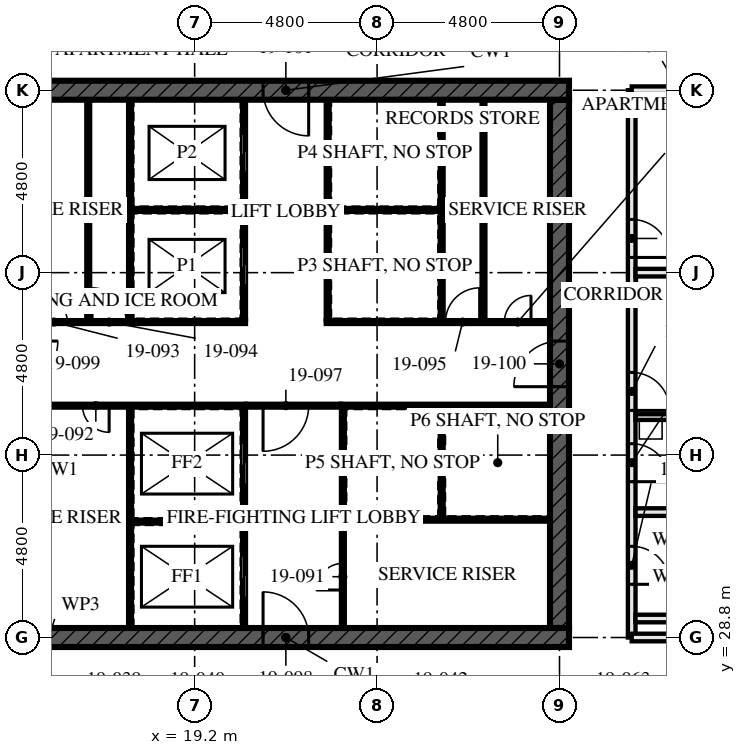
"""IFC4 building model, lengths in metres.
Left out: names, types, materials, properties, quantities, classifications, styles, units other than length and angle.
Written with IfcOpenShell. Run it as: python <this file> out.ifc"""

import sys

from ifc_helpers import new_model, si_unit, direction, frame, frame_2d, origin, place, context, subcontext, project, spatial, rectangle, extrude, element, fill, save


model = new_model("IFC4")
c1 = context("Model", 3, precision=1e-05, world=origin(), true_north=direction((0.0, 1.0)))
c2 = subcontext(c1, "Body", "Model", "MODEL_VIEW")
j1 = project(units=[si_unit("LENGTHUNIT", "METRE"), si_unit("PLANEANGLEUNIT", "RADIAN")], contexts=[c1])
p1 = place(None, origin())
s1 = spatial("IfcSite", under=j1, at=p1, CompositionType="ELEMENT")
p2 = place(p1, origin())
s2 = spatial("IfcBuilding", under=s1, at=p2, CompositionType="ELEMENT")
p3 = place(p2, frame((0.0, 0.0, 72.5)))
s3 = spatial("IfcBuildingStorey", under=s2, at=p3, CompositionType="ELEMENT", Elevation=72.5)
p4 = place(p3, frame((14.15, 28.8, -0.17), z_axis=(0.0, 0.0, 1.0), x_axis=(1.0, 0.0, 0.0)))
e1 = element("IfcWall", 1, at=p4, inside=s3, PredefinedType="SHEAR", context=c2, shape_type="SweptSolid", body=[
    extrude(rectangle(XDim=14.9, YDim=0.5, at=frame_2d((7.45, 0.0))), origin(), (0.0, 0.0, 1.0), 3.5),
])
p5 = place(p4, frame((6.85, 0.0, 0.17)))
e2 = element("IfcOpeningElement", 2, at=p5, cuts=e1, PredefinedType="OPENING", context=c2, shape_type="SweptSolid", body=[
    extrude(rectangle(XDim=1.2, YDim=2.1, at=frame_2d((0.6, 1.05))), frame((0.0, 0.26, 0.0), z_axis=(0.0, -1.0, 0.0), x_axis=(1.0, 0.0, 0.0)), (0.0, 0.0, 1.0), 0.521),
])
p6 = place(p3, frame((29.05, 43.2, -0.17), z_axis=(0.0, 0.0, 1.0), x_axis=(-1.0, 0.0, 0.0)))
e3 = element("IfcWall", 3, at=p6, inside=s3, PredefinedType="SHEAR", context=c2, shape_type="SweptSolid", body=[
    extrude(rectangle(XDim=14.9, YDim=0.5, at=frame_2d((7.45, 0.0))), origin(), (0.0, 0.0, 1.0), 3.5),
])
p7 = place(p6, frame((6.85, 0.0, 0.17)))
e4 = element("IfcOpeningElement", 4, at=p7, cuts=e3, PredefinedType="OPENING", context=c2, shape_type="SweptSolid", body=[
    extrude(rectangle(XDim=1.2, YDim=2.1, at=frame_2d((0.6, 1.05))), frame((0.0, 0.26, 0.0), z_axis=(0.0, -1.0, 0.0), x_axis=(1.0, 0.0, 0.0)), (0.0, 0.0, 1.0), 0.521),
])
p8 = place(p3, frame((28.8, 29.05, -0.17), z_axis=(0.0, 0.0, 1.0), x_axis=(0.0, 1.0, 0.0)))
e5 = element("IfcWall", 5, at=p8, inside=s3, PredefinedType="SHEAR", context=c2, shape_type="SweptSolid", body=[
    extrude(rectangle(XDim=13.9, YDim=0.5, at=frame_2d((6.95, 0.0))), origin(), (0.0, 0.0, 1.0), 3.5),
])
p9 = place(p8, frame((6.35, 0.0, 0.17)))
e6 = element("IfcOpeningElement", 6, at=p9, cuts=e5, PredefinedType="OPENING", context=c2, shape_type="SweptSolid", body=[
    extrude(rectangle(XDim=1.2, YDim=2.1, at=frame_2d((0.6, 1.05))), frame((0.0, 0.26, 0.0), z_axis=(0.0, -1.0, 0.0), x_axis=(1.0, 0.0, 0.0)), (0.0, 0.0, 1.0), 0.521),
])
for number, where, z_axis, x_axis in (
    (7, (35.5, 29.3, 0.0), (0.0, 0.0, 1.0), (-1.0, 0.0, 0.0)),
    (8, (35.5, 32.1, 0.0), (0.0, 0.0, 1.0), (-1.0, 0.0, 0.0)),
):
    element("IfcWall", number, at=place(p3, frame(where, z_axis=z_axis, x_axis=x_axis)), inside=s3, PredefinedType="SOLIDWALL", context=c2, shape_type="SweptSolid", body=[
        extrude(rectangle(XDim=4.7, YDim=0.2, at=frame_2d((2.35, 0.0))), origin(), (0.0, 0.0, 1.0), 2.99),
    ])
p10 = place(p3, frame((33.8, 34.6, 0.0), z_axis=(0.0, 0.0, 1.0), x_axis=(-1.0, 0.0, 0.0)))
e9 = element("IfcWall", 9, at=p10, inside=s3, PredefinedType="PARTITIONING", context=c2, shape_type="SweptSolid", body=[
    extrude(rectangle(XDim=3.0, YDim=0.15, at=frame_2d((1.5, 0.0))), origin(), (0.0, 0.0, 1.0), 3.33),
])
p11 = place(p3, frame((42.88, 38.4, 0.0), z_axis=(0.0, 0.0, 1.0), x_axis=(-1.0, 0.0, 0.0)))
e10 = element("IfcWall", 10, at=p11, inside=s3, PredefinedType="PARTITIONING", context=c2, shape_type="SweptSolid", body=[
    extrude(rectangle(XDim=12.08, YDim=0.2, at=frame_2d((6.04, 0.0))), origin(), (0.0, 0.0, 1.0), 2.55),
])
p12 = place(p3, frame((30.7, 28.8, 0.0), z_axis=(0.0, 0.0, 1.0), x_axis=(0.0, 1.0, 0.0)))
e11 = element("IfcWall", 11, at=p12, inside=s3, PredefinedType="PARTITIONING", context=c2, shape_type="SweptSolid", body=[
    extrude(rectangle(XDim=14.4, YDim=0.2, at=frame_2d((7.2, 0.0))), origin(), (0.0, 0.0, 1.0), 2.55),
])
p13 = place(p12, frame((1.4, 0.0, 0.0)))
e12 = element("IfcOpeningElement", 12, at=p13, cuts=e11, PredefinedType="OPENING", context=c2, shape_type="SweptSolid", body=[
    extrude(rectangle(XDim=1.0, YDim=2.1, at=frame_2d((0.5, 1.05))), frame((0.0, 0.111, 0.0), z_axis=(0.0, -1.0, 0.0), x_axis=(1.0, 0.0, 0.0)), (0.0, 0.0, 1.0), 0.221),
])
p14 = place(p12, frame((4.1, 0.0, 0.0)))
e13 = element("IfcOpeningElement", 13, at=p14, cuts=e11, PredefinedType="OPENING", context=c2, shape_type="SweptSolid", body=[
    extrude(rectangle(XDim=1.0, YDim=2.1, at=frame_2d((0.5, 1.05))), frame((0.0, 0.111, 0.0), z_axis=(0.0, -1.0, 0.0), x_axis=(1.0, 0.0, 0.0)), (0.0, 0.0, 1.0), 0.221),
])
p15 = place(p12, frame((5.975, 0.0, 0.0)))
e14 = element("IfcOpeningElement", 14, at=p15, cuts=e11, PredefinedType="OPENING", context=c2, shape_type="SweptSolid", body=[
    extrude(rectangle(XDim=1.0, YDim=2.1, at=frame_2d((0.5, 1.05))), frame((0.0, 0.111, 0.0), z_axis=(0.0, -1.0, 0.0), x_axis=(1.0, 0.0, 0.0)), (0.0, 0.0, 1.0), 0.221),
])
p16 = place(p12, frame((10.0, 0.0, 0.0)))
e15 = element("IfcOpeningElement", 15, at=p16, cuts=e11, PredefinedType="OPENING", context=c2, shape_type="SweptSolid", body=[
    extrude(rectangle(XDim=1.0, YDim=2.1, at=frame_2d((0.5, 1.05))), frame((0.0, 0.111, 0.0), z_axis=(0.0, -1.0, 0.0), x_axis=(1.0, 0.0, 0.0)), (0.0, 0.0, 1.0), 0.221),
])
for number, where, z_axis, x_axis in (
    (16, (16.4, 37.15, 0.0), (0.0, 0.0, 1.0), (0.0, 1.0, 0.0)),
    (17, (26.8, 37.15, 0.0), (0.0, 0.0, 1.0), (0.0, 1.0, 0.0)),
):
    element("IfcWall", number, at=place(p3, frame(where, z_axis=z_axis, x_axis=x_axis)), inside=s3, PredefinedType="SOLIDWALL", context=c2, shape_type="SweptSolid", body=[
        extrude(rectangle(XDim=5.8, YDim=0.1, at=frame_2d((2.9, 0.0))), origin(), (0.0, 0.0, 1.0), 3.33),
    ])
p17 = place(p3, frame((20.5, 29.05, 0.0), z_axis=(0.0, 0.0, 1.0), x_axis=(0.0, 1.0, 0.0)))
e18 = element("IfcWall", 18, at=p17, inside=s3, PredefinedType="SOLIDWALL", context=c2, shape_type="SweptSolid", body=[
    extrude(rectangle(XDim=5.8, YDim=0.1, at=frame_2d((2.9, 0.0))), origin(), (0.0, 0.0, 1.0), 3.33),
])
p18 = place(p17, frame((0.8, 0.0, 0.0)))
e19 = element("IfcOpeningElement", 19, at=p18, cuts=e18, PredefinedType="OPENING", context=c2, shape_type="SweptSolid", body=[
    extrude(rectangle(XDim=1.1, YDim=2.3, at=frame_2d((0.55, 1.15))), frame((0.0, 0.061, 0.0), z_axis=(0.0, -1.0, 0.0), x_axis=(1.0, 0.0, 0.0)), (0.0, 0.0, 1.0), 0.121),
])
p19 = place(p17, frame((3.775, 0.0, 0.0)))
e20 = element("IfcOpeningElement", 20, at=p19, cuts=e18, PredefinedType="OPENING", context=c2, shape_type="SweptSolid", body=[
    extrude(rectangle(XDim=1.1, YDim=2.3, at=frame_2d((0.55, 1.15))), frame((0.0, 0.061, 0.0), z_axis=(0.0, -1.0, 0.0), x_axis=(1.0, 0.0, 0.0)), (0.0, 0.0, 1.0), 0.121),
])
p20 = place(p3, frame((20.5, 37.15, 0.0), z_axis=(0.0, 0.0, 1.0), x_axis=(0.0, 1.0, 0.0)))
e21 = element("IfcWall", 21, at=p20, inside=s3, PredefinedType="SOLIDWALL", context=c2, shape_type="SweptSolid", body=[
    extrude(rectangle(XDim=5.8, YDim=0.1, at=frame_2d((2.9, 0.0))), origin(), (0.0, 0.0, 1.0), 3.33),
])
p21 = place(p20, frame((0.925, 0.0, 0.0)))
e22 = element("IfcOpeningElement", 22, at=p21, cuts=e21, PredefinedType="OPENING", context=c2, shape_type="SweptSolid", body=[
    extrude(rectangle(XDim=1.0, YDim=2.1, at=frame_2d((0.5, 1.05))), frame((0.0, 0.061, 0.0), z_axis=(0.0, -1.0, 0.0), x_axis=(1.0, 0.0, 0.0)), (0.0, 0.0, 1.0), 0.121),
])
p22 = place(p20, frame((3.9, 0.0, 0.0)))
e23 = element("IfcOpeningElement", 23, at=p22, cuts=e21, PredefinedType="OPENING", context=c2, shape_type="SweptSolid", body=[
    extrude(rectangle(XDim=1.0, YDim=2.1, at=frame_2d((0.5, 1.05))), frame((0.0, 0.061, 0.0), z_axis=(0.0, -1.0, 0.0), x_axis=(1.0, 0.0, 0.0)), (0.0, 0.0, 1.0), 0.121),
])
p23 = place(p3, frame((22.7, 37.15, 0.0), z_axis=(0.0, 0.0, 1.0), x_axis=(0.0, 1.0, 0.0)))
e24 = element("IfcWall", 24, at=p23, inside=s3, PredefinedType="SOLIDWALL", context=c2, shape_type="SweptSolid", body=[
    extrude(rectangle(XDim=5.8, YDim=0.1, at=frame_2d((2.9, 0.0))), origin(), (0.0, 0.0, 1.0), 3.33),
])
p24 = place(p3, frame((23.1, 29.05, 0.0), z_axis=(0.0, 0.0, 1.0), x_axis=(0.0, 1.0, 0.0)))
e25 = element("IfcWall", 25, at=p24, inside=s3, PredefinedType="SOLIDWALL", context=c2, shape_type="SweptSolid", body=[
    extrude(rectangle(XDim=5.8, YDim=0.1, at=frame_2d((2.9, 0.0))), origin(), (0.0, 0.0, 1.0), 3.33),
])
p25 = place(p24, frame((1.0, 0.0, 0.0)))
e26 = element("IfcOpeningElement", 26, at=p25, cuts=e25, PredefinedType="OPENING", context=c2, shape_type="SweptSolid", body=[
    extrude(rectangle(XDim=0.7, YDim=2.1, at=frame_2d((0.35, 1.05))), frame((0.0, 0.061, 0.0), z_axis=(0.0, -1.0, 0.0), x_axis=(1.0, 0.0, 0.0)), (0.0, 0.0, 1.0), 0.121),
])
p26 = place(p3, frame((14.65, 34.9, 0.0), z_axis=(0.0, 0.0, 1.0), x_axis=(1.0, 0.0, 0.0)))
e27 = element("IfcWall", 27, at=p26, inside=s3, PredefinedType="SOLIDWALL", context=c2, shape_type="SweptSolid", body=[
    extrude(rectangle(XDim=5.9, YDim=0.1, at=frame_2d((2.95, 0.0))), origin(), (0.0, 0.0, 1.0), 3.33),
])
p27 = place(p26, frame((1.6, 0.0, 0.0)))
e28 = element("IfcOpeningElement", 28, at=p27, cuts=e27, PredefinedType="OPENING", context=c2, shape_type="SweptSolid", body=[
    extrude(rectangle(XDim=0.7, YDim=2.1, at=frame_2d((0.35, 1.05))), frame((0.0, 0.061, 0.0), z_axis=(0.0, -1.0, 0.0), x_axis=(1.0, 0.0, 0.0)), (0.0, 0.0, 1.0), 0.121),
])
p28 = place(p3, frame((23.05, 34.9, 0.0), z_axis=(0.0, 0.0, 1.0), x_axis=(1.0, 0.0, 0.0)))
e29 = element("IfcWall", 29, at=p28, inside=s3, PredefinedType="SOLIDWALL", context=c2, shape_type="SweptSolid", body=[
    extrude(rectangle(XDim=5.5, YDim=0.1, at=frame_2d((2.75, 0.0))), origin(), (0.0, 0.0, 1.0), 3.33),
])
p29 = place(p3, frame((14.65, 37.1, 0.0), z_axis=(0.0, 0.0, 1.0), x_axis=(1.0, 0.0, 0.0)))
e30 = element("IfcWall", 30, at=p29, inside=s3, PredefinedType="SOLIDWALL", context=c2, shape_type="SweptSolid", body=[
    extrude(rectangle(XDim=5.9, YDim=0.1, at=frame_2d((2.95, 0.0))), origin(), (0.0, 0.0, 1.0), 3.33),
])
p30 = place(p29, frame((0.5, 0.0, 0.0)))
e31 = element("IfcOpeningElement", 31, at=p30, cuts=e30, PredefinedType="OPENING", context=c2, shape_type="SweptSolid", body=[
    extrude(rectangle(XDim=0.7, YDim=2.1, at=frame_2d((0.35, 1.05))), frame((0.0, 0.061, 0.0), z_axis=(0.0, -1.0, 0.0), x_axis=(1.0, 0.0, 0.0)), (0.0, 0.0, 1.0), 0.121),
])
p31 = place(p29, frame((1.85, 0.0, 0.0)))
e32 = element("IfcOpeningElement", 32, at=p31, cuts=e30, PredefinedType="OPENING", context=c2, shape_type="SweptSolid", body=[
    extrude(rectangle(XDim=0.9, YDim=2.1, at=frame_2d((0.45, 1.05))), frame((0.0, 0.061, 0.0), z_axis=(0.0, -1.0, 0.0), x_axis=(1.0, 0.0, 0.0)), (0.0, 0.0, 1.0), 0.121),
])
p32 = place(p3, frame((22.65, 37.1, 0.0), z_axis=(0.0, 0.0, 1.0), x_axis=(1.0, 0.0, 0.0)))
e33 = element("IfcWall", 33, at=p32, inside=s3, PredefinedType="SOLIDWALL", context=c2, shape_type="SweptSolid", body=[
    extrude(rectangle(XDim=5.9, YDim=0.1, at=frame_2d((2.95, 0.0))), origin(), (0.0, 0.0, 1.0), 3.33),
])
p33 = place(p32, frame((3.15, 0.0, 0.0)))
e34 = element("IfcOpeningElement", 34, at=p33, cuts=e33, PredefinedType="OPENING", context=c2, shape_type="SweptSolid", body=[
    extrude(rectangle(XDim=0.9, YDim=2.1, at=frame_2d((0.45, 1.05))), frame((0.0, 0.061, 0.0), z_axis=(0.0, -1.0, 0.0), x_axis=(1.0, 0.0, 0.0)), (0.0, 0.0, 1.0), 0.121),
])
p34 = place(p32, frame((4.7, 0.0, 0.0)))
e35 = element("IfcOpeningElement", 35, at=p34, cuts=e33, PredefinedType="OPENING", context=c2, shape_type="SweptSolid", body=[
    extrude(rectangle(XDim=0.7, YDim=2.1, at=frame_2d((0.35, 1.05))), frame((0.0, 0.061, 0.0), z_axis=(0.0, -1.0, 0.0), x_axis=(1.0, 0.0, 0.0)), (0.0, 0.0, 1.0), 0.121),
])
p35 = place(p3, frame((20.55, 34.9, 0.0), z_axis=(0.0, 0.0, 1.0), x_axis=(1.0, 0.0, 0.0)))
e36 = element("IfcWall", 36, at=p35, inside=s3, PredefinedType="SOLIDWALL", context=c2, shape_type="SweptSolid", body=[
    extrude(rectangle(XDim=2.5, YDim=0.1, at=frame_2d((1.25, 0.0))), origin(), (0.0, 0.0, 1.0), 3.33),
])
p36 = place(p35, frame((0.45, 0.0, 0.0)))
e37 = element("IfcOpeningElement", 37, at=p36, cuts=e36, PredefinedType="OPENING", context=c2, shape_type="SweptSolid", body=[
    extrude(rectangle(XDim=1.2, YDim=2.1, at=frame_2d((0.6, 1.05))), frame((0.0, 0.061, 0.0), z_axis=(0.0, -1.0, 0.0), x_axis=(1.0, 0.0, 0.0)), (0.0, 0.0, 1.0), 0.121),
])
p37 = place(p3, frame((17.5, 29.05, 0.0), z_axis=(0.0, 0.0, 1.0), x_axis=(0.0, 1.0, 0.0)))
e38 = element("IfcWall", 38, at=p37, inside=s3, PredefinedType="SOLIDWALL", context=c2, shape_type="SweptSolid", body=[
    extrude(rectangle(XDim=5.8, YDim=0.1, at=frame_2d((2.9, 0.0))), origin(), (0.0, 0.0, 1.0), 3.33),
])
p38 = place(p3, frame((17.55, 31.85, 0.0), z_axis=(0.0, 0.0, 1.0), x_axis=(1.0, 0.0, 0.0)))
e39 = element("IfcWall", 39, at=p38, inside=s3, PredefinedType="SOLIDWALL", context=c2, shape_type="SweptSolid", body=[
    extrude(rectangle(XDim=2.9, YDim=0.1, at=frame_2d((1.45, 0.0))), origin(), (0.0, 0.0, 1.0), 3.33),
])
p39 = place(p3, frame((17.5, 37.15, 0.0), z_axis=(0.0, 0.0, 1.0), x_axis=(0.0, 1.0, 0.0)))
e40 = element("IfcWall", 40, at=p39, inside=s3, PredefinedType="SOLIDWALL", context=c2, shape_type="SweptSolid", body=[
    extrude(rectangle(XDim=5.8, YDim=0.1, at=frame_2d((2.9, 0.0))), origin(), (0.0, 0.0, 1.0), 3.33),
])
for number, where, z_axis, x_axis in (
    (41, (17.55, 40.05, 0.0), (0.0, 0.0, 1.0), (1.0, 0.0, 0.0)),
    (42, (22.75, 40.05, 0.0), (0.0, 0.0, 1.0), (1.0, 0.0, 0.0)),
):
    element("IfcWall", number, at=place(p3, frame(where, z_axis=z_axis, x_axis=x_axis)), inside=s3, PredefinedType="SOLIDWALL", context=c2, shape_type="SweptSolid", body=[
        extrude(rectangle(XDim=2.9, YDim=0.1, at=frame_2d((1.45, 0.0))), origin(), (0.0, 0.0, 1.0), 3.33),
    ])
p40 = place(p3, frame((25.7, 37.15, 0.0), z_axis=(0.0, 0.0, 1.0), x_axis=(0.0, 1.0, 0.0)))
e43 = element("IfcWall", 43, at=p40, inside=s3, PredefinedType="SOLIDWALL", context=c2, shape_type="SweptSolid", body=[
    extrude(rectangle(XDim=5.8, YDim=0.1, at=frame_2d((2.9, 0.0))), origin(), (0.0, 0.0, 1.0), 3.33),
])
p41 = place(p3, frame((25.7, 31.95, 0.0), z_axis=(0.0, 0.0, 1.0), x_axis=(0.0, 1.0, 0.0)))
e44 = element("IfcWall", 44, at=p41, inside=s3, PredefinedType="SOLIDWALL", context=c2, shape_type="SweptSolid", body=[
    extrude(rectangle(XDim=2.9, YDim=0.1, at=frame_2d((1.45, 0.0))), origin(), (0.0, 0.0, 1.0), 3.33),
])
p42 = place(p3, frame((23.15, 31.9, 0.0), z_axis=(0.0, 0.0, 1.0), x_axis=(1.0, 0.0, 0.0)))
e45 = element("IfcWall", 45, at=p42, inside=s3, PredefinedType="SOLIDWALL", context=c2, shape_type="SweptSolid", body=[
    extrude(rectangle(XDim=5.4, YDim=0.1, at=frame_2d((2.7, 0.0))), origin(), (0.0, 0.0, 1.0), 3.33),
])
for number, where, z_axis, x_axis in (
    (46, (33.205, 28.8, 0.0), (0.0, 0.0, 1.0), (-1.0, 0.0, 0.0)),
    (47, (33.205, 43.2, 0.0), (0.0, 0.0, 1.0), (-1.0, 0.0, 0.0)),
):
    element("IfcWall", number, at=place(p3, frame(where, z_axis=z_axis, x_axis=x_axis)), inside=s3, PredefinedType="PARTITIONING", context=c2, shape_type="SweptSolid", body=[
        extrude(rectangle(XDim=2.505, YDim=0.2, at=frame_2d((1.252, 0.0))), origin(), (0.0, 0.0, 1.0), 2.32),
    ])
p43 = place(p13, frame((1.0, 0.0, 0.0), z_axis=(0.0, 0.0, 1.0), x_axis=(-1.0, 0.0, 0.0)))
e48 = element("IfcDoor", 48, at=p43, inside=s3, OperationType="SINGLE_SWING_LEFT", PredefinedType="DOOR", context=c2, shape_type="SweptSolid", body=[
    extrude(rectangle(XDim=1.0, YDim=2.1, at=frame_2d((0.5, 1.05))), frame((0.0, 0.032, 0.0), z_axis=(0.0, -1.0, 0.0), x_axis=(1.0, 0.0, 0.0)), (0.0, 0.0, 1.0), 0.064),
])
fill(e12, e48)
p44 = place(p14, frame((1.0, 0.0, 0.0), z_axis=(0.0, 0.0, 1.0), x_axis=(-1.0, 0.0, 0.0)))
e49 = element("IfcDoor", 49, at=p44, inside=s3, OperationType="SINGLE_SWING_LEFT", PredefinedType="DOOR", context=c2, shape_type="SweptSolid", body=[
    extrude(rectangle(XDim=1.0, YDim=2.1, at=frame_2d((0.5, 1.05))), frame((0.0, 0.027, 0.0), z_axis=(0.0, -1.0, 0.0), x_axis=(1.0, 0.0, 0.0)), (0.0, 0.0, 1.0), 0.054),
])
fill(e13, e49)
p45 = place(p15, frame((1.0, 0.0, 0.0), z_axis=(0.0, 0.0, 1.0), x_axis=(-1.0, 0.0, 0.0)))
e50 = element("IfcDoor", 50, at=p45, inside=s3, OperationType="SINGLE_SWING_LEFT", PredefinedType="DOOR", context=c2, shape_type="SweptSolid", body=[
    extrude(rectangle(XDim=1.0, YDim=2.1, at=frame_2d((0.5, 1.05))), frame((0.0, 0.027, 0.0), z_axis=(0.0, -1.0, 0.0), x_axis=(1.0, 0.0, 0.0)), (0.0, 0.0, 1.0), 0.054),
])
fill(e14, e50)
p46 = place(p16, frame((1.0, 0.0, 0.0), z_axis=(0.0, 0.0, 1.0), x_axis=(-1.0, 0.0, 0.0)))
e51 = element("IfcDoor", 51, at=p46, inside=s3, OperationType="SINGLE_SWING_LEFT", PredefinedType="DOOR", context=c2, shape_type="SweptSolid", body=[
    extrude(rectangle(XDim=1.0, YDim=2.1, at=frame_2d((0.5, 1.05))), frame((0.0, 0.027, 0.0), z_axis=(0.0, -1.0, 0.0), x_axis=(1.0, 0.0, 0.0)), (0.0, 0.0, 1.0), 0.054),
])
fill(e15, e51)
p47 = place(p18, origin())
e52 = element("IfcDoor", 52, at=p47, inside=s3, OperationType="SLIDING_TO_LEFT", PredefinedType="DOOR", context=c2, shape_type="SweptSolid", body=[
    extrude(rectangle(XDim=1.1, YDim=2.3, at=frame_2d((0.55, 1.15))), frame((0.0, 0.05, 0.0), z_axis=(0.0, -1.0, 0.0), x_axis=(1.0, 0.0, 0.0)), (0.0, 0.0, 1.0), 0.1),
])
fill(e19, e52)
p48 = place(p19, origin())
e53 = element("IfcDoor", 53, at=p48, inside=s3, OperationType="SLIDING_TO_LEFT", PredefinedType="DOOR", context=c2, shape_type="SweptSolid", body=[
    extrude(rectangle(XDim=1.1, YDim=2.3, at=frame_2d((0.55, 1.15))), frame((0.0, 0.05, 0.0), z_axis=(0.0, -1.0, 0.0), x_axis=(1.0, 0.0, 0.0)), (0.0, 0.0, 1.0), 0.1),
])
fill(e20, e53)
p49 = place(p21, origin())
e54 = element("IfcDoor", 54, at=p49, inside=s3, OperationType="SLIDING_TO_LEFT", PredefinedType="DOOR", context=c2, shape_type="SweptSolid", body=[
    extrude(rectangle(XDim=1.0, YDim=2.1, at=frame_2d((0.5, 1.05))), frame((0.0, 0.05, 0.0), z_axis=(0.0, -1.0, 0.0), x_axis=(1.0, 0.0, 0.0)), (0.0, 0.0, 1.0), 0.1),
])
fill(e22, e54)
p50 = place(p22, origin())
e55 = element("IfcDoor", 55, at=p50, inside=s3, OperationType="SLIDING_TO_LEFT", PredefinedType="DOOR", context=c2, shape_type="SweptSolid", body=[
    extrude(rectangle(XDim=1.0, YDim=2.1, at=frame_2d((0.5, 1.05))), frame((0.0, 0.05, 0.0), z_axis=(0.0, -1.0, 0.0), x_axis=(1.0, 0.0, 0.0)), (0.0, 0.0, 1.0), 0.1),
])
fill(e23, e55)
p51 = place(p25, origin())
e56 = element("IfcDoor", 56, at=p51, inside=s3, OperationType="SINGLE_SWING_RIGHT", PredefinedType="DOOR", context=c2, shape_type="SweptSolid", body=[
    extrude(rectangle(XDim=0.7, YDim=2.1, at=frame_2d((0.35, 1.05))), frame((0.0, 0.027, 0.0), z_axis=(0.0, -1.0, 0.0), x_axis=(1.0, 0.0, 0.0)), (0.0, 0.0, 1.0), 0.054),
])
fill(e26, e56)
p52 = place(p27, frame((0.7, 0.0, 0.0), z_axis=(0.0, 0.0, 1.0), x_axis=(-1.0, 0.0, 0.0)))
e57 = element("IfcDoor", 57, at=p52, inside=s3, OperationType="SINGLE_SWING_RIGHT", PredefinedType="DOOR", context=c2, shape_type="SweptSolid", body=[
    extrude(rectangle(XDim=0.7, YDim=2.1, at=frame_2d((0.35, 1.05))), frame((0.0, 0.027, 0.0), z_axis=(0.0, -1.0, 0.0), x_axis=(1.0, 0.0, 0.0)), (0.0, 0.0, 1.0), 0.054),
])
fill(e28, e57)
p53 = place(p30, origin())
e58 = element("IfcDoor", 58, at=p53, inside=s3, OperationType="SINGLE_SWING_RIGHT", PredefinedType="DOOR", context=c2, shape_type="SweptSolid", body=[
    extrude(rectangle(XDim=0.7, YDim=2.1, at=frame_2d((0.35, 1.05))), frame((0.0, 0.027, 0.0), z_axis=(0.0, -1.0, 0.0), x_axis=(1.0, 0.0, 0.0)), (0.0, 0.0, 1.0), 0.054),
])
fill(e31, e58)
p54 = place(p31, origin())
e59 = element("IfcDoor", 59, at=p54, inside=s3, OperationType="SINGLE_SWING_RIGHT", PredefinedType="DOOR", context=c2, shape_type="SweptSolid", body=[
    extrude(rectangle(XDim=0.9, YDim=2.1, at=frame_2d((0.45, 1.05))), frame((0.0, 0.027, 0.0), z_axis=(0.0, -1.0, 0.0), x_axis=(1.0, 0.0, 0.0)), (0.0, 0.0, 1.0), 0.054),
])
fill(e32, e59)
p55 = place(p33, origin())
e60 = element("IfcDoor", 60, at=p55, inside=s3, OperationType="SINGLE_SWING_LEFT", PredefinedType="DOOR", context=c2, shape_type="SweptSolid", body=[
    extrude(rectangle(XDim=0.9, YDim=2.1, at=frame_2d((0.45, 1.05))), frame((0.0, 0.027, 0.0), z_axis=(0.0, -1.0, 0.0), x_axis=(1.0, 0.0, 0.0)), (0.0, 0.0, 1.0), 0.054),
])
fill(e34, e60)
p56 = place(p34, origin())
e61 = element("IfcDoor", 61, at=p56, inside=s3, OperationType="SINGLE_SWING_LEFT", PredefinedType="DOOR", context=c2, shape_type="SweptSolid", body=[
    extrude(rectangle(XDim=0.7, YDim=2.1, at=frame_2d((0.35, 1.05))), frame((0.0, 0.027, 0.0), z_axis=(0.0, -1.0, 0.0), x_axis=(1.0, 0.0, 0.0)), (0.0, 0.0, 1.0), 0.054),
])
fill(e35, e61)
p57 = place(p36, frame((1.2, 0.0, 0.0), z_axis=(0.0, 0.0, 1.0), x_axis=(-1.0, 0.0, 0.0)))
e62 = element("IfcDoor", 62, at=p57, inside=s3, OperationType="SINGLE_SWING_LEFT", PredefinedType="DOOR", context=c2, shape_type="SweptSolid", body=[
    extrude(rectangle(XDim=1.2, YDim=2.1, at=frame_2d((0.6, 1.05))), frame((0.0, 0.027, 0.0), z_axis=(0.0, -1.0, 0.0), x_axis=(1.0, 0.0, 0.0)), (0.0, 0.0, 1.0), 0.054),
])
fill(e37, e62)
p58 = place(p5, origin())
e63 = element("IfcDoor", 63, at=p58, inside=s3, OperationType="SINGLE_SWING_LEFT", PredefinedType="DOOR", context=c2, shape_type="SweptSolid", body=[
    extrude(rectangle(XDim=1.2, YDim=2.1, at=frame_2d((0.6, 1.05))), frame((0.0, 0.027, 0.0), z_axis=(0.0, -1.0, 0.0), x_axis=(1.0, 0.0, 0.0)), (0.0, 0.0, 1.0), 0.054),
])
fill(e2, e63)
p59 = place(p9, origin())
e64 = element("IfcDoor", 64, at=p59, inside=s3, OperationType="SINGLE_SWING_LEFT", PredefinedType="DOOR", context=c2, shape_type="SweptSolid", body=[
    extrude(rectangle(XDim=1.2, YDim=2.1, at=frame_2d((0.6, 1.05))), frame((0.0, 0.027, 0.0), z_axis=(0.0, -1.0, 0.0), x_axis=(1.0, 0.0, 0.0)), (0.0, 0.0, 1.0), 0.054),
])
fill(e6, e64)
p60 = place(p7, origin())
e65 = element("IfcDoor", 65, at=p60, inside=s3, OperationType="SINGLE_SWING_LEFT", PredefinedType="DOOR", context=c2, shape_type="SweptSolid", body=[
    extrude(rectangle(XDim=1.2, YDim=2.1, at=frame_2d((0.6, 1.05))), frame((0.0, 0.027, 0.0), z_axis=(0.0, -1.0, 0.0), x_axis=(1.0, 0.0, 0.0)), (0.0, 0.0, 1.0), 0.054),
])
fill(e4, e65)
save(model, sys.argv[1])
